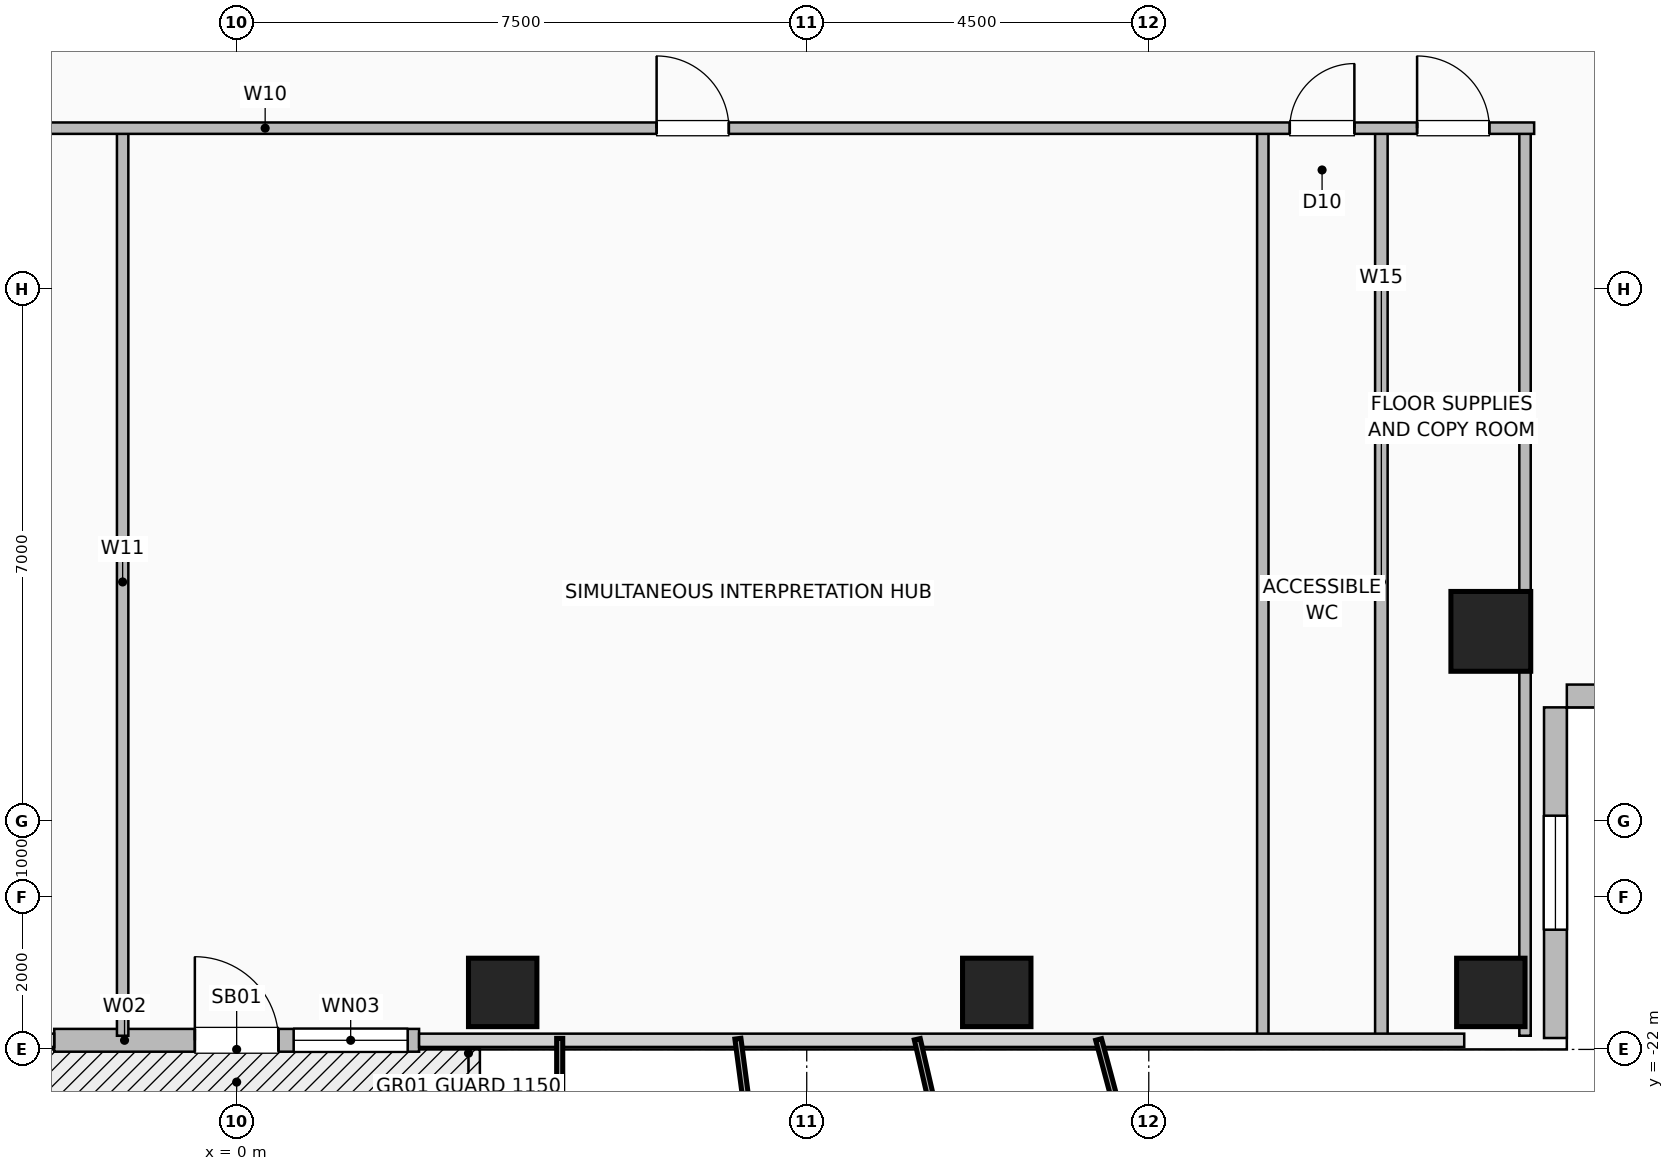
"""IFC4 building model, lengths in metres.
Left out: names, types, materials, properties, quantities, classifications, styles, units other than length and angle.
Written with IfcOpenShell. Run it as: python <this file> out.ifc"""

import sys

from ifc_helpers import new_model, si_unit, direction, frame, frame_2d, origin, origin_2d, place, context, subcontext, project, spatial, rectangle, hollow_rectangle, extrude, element, fill, save


model = new_model("IFC4")
c1 = context("Model", 3, precision=1e-05, world=origin(), true_north=direction((0.0, 1.0)))
c2 = subcontext(c1, "Body", "Model", "MODEL_VIEW")
j1 = project(units=[si_unit("LENGTHUNIT", "METRE"), si_unit("PLANEANGLEUNIT", "RADIAN")], contexts=[c1])
p1 = place(None, origin())
s1 = spatial("IfcSite", under=j1, at=p1, CompositionType="ELEMENT")
p2 = place(p1, origin())
s2 = spatial("IfcBuilding", under=s1, at=p2, CompositionType="ELEMENT")
p3 = place(p2, frame((0.0, 0.0, 104.8)))
s3 = spatial("IfcBuildingStorey", under=s2, at=p3, CompositionType="ELEMENT", Elevation=104.8)
for number, where, z_axis, x_axis in (
    (1, (3.5, -21.25, 0.0), (0.0, 0.0, 1.0), (1.0, 0.0, 0.0)),
    (2, (10.0, -21.25, 0.0), (0.0, 0.0, 1.0), (1.0, 0.0, 0.0)),
    (3, (16.5, -21.25, 0.0), (0.0, 0.0, 1.0), (1.0, 0.0, 0.0)),
):
    element("IfcColumn", number, at=place(p3, frame(where, z_axis=z_axis, x_axis=x_axis)), inside=s3, PredefinedType="COLUMN", context=c2, shape_type="SweptSolid", body=[
        extrude(hollow_rectangle(XDim=0.9, YDim=0.9, WallThickness=0.045, at=origin_2d()), origin(), (0.0, 0.0, 1.0), 3.6),
    ])
p4 = place(p3, frame((16.5, -16.5, 0.0), z_axis=(0.0, 0.0, 1.0), x_axis=(1.0, 0.0, 0.0)))
e4 = element("IfcColumn", 4, at=p4, inside=s3, PredefinedType="COLUMN", context=c2, shape_type="SweptSolid", body=[
    extrude(hollow_rectangle(XDim=1.05, YDim=1.05, WallThickness=0.05, at=origin_2d()), origin(), (0.0, 0.0, 1.0), 3.6),
])
p5 = place(p3, frame((-2.4, -21.88, 0.0), z_axis=(0.0, 0.0, 1.0), x_axis=(1.0, 0.0, 0.0)))
e5 = element("IfcWall", 5, at=p5, inside=s3, PredefinedType="SOLIDWALL", context=c2, shape_type="SweptSolid", body=[
    extrude(rectangle(XDim=4.8, YDim=0.3, at=frame_2d((2.4, 0.0))), origin(), (0.0, 0.0, 1.0), 3.36),
])
p6 = place(p5, frame((1.85, 0.0, 0.0)))
e6 = element("IfcOpeningElement", 6, at=p6, cuts=e5, PredefinedType="OPENING", context=c2, shape_type="SweptSolid", body=[
    extrude(rectangle(XDim=1.1, YDim=2.2, at=frame_2d((0.55, 1.1))), frame((0.0, 0.16, 0.0), z_axis=(0.0, -1.0, 0.0), x_axis=(1.0, 0.0, 0.0)), (0.0, 0.0, 1.0), 0.32),
])
p7 = place(p5, frame((3.15, 0.0, 0.85)))
e7 = element("IfcOpeningElement", 7, at=p7, cuts=e5, PredefinedType="OPENING", context=c2, shape_type="SweptSolid", body=[
    extrude(rectangle(XDim=1.5, YDim=1.8, at=frame_2d((0.75, 0.9))), frame((0.0, 0.16, 0.0), z_axis=(0.0, -1.0, 0.0), x_axis=(1.0, 0.0, 0.0)), (0.0, 0.0, 1.0), 0.32),
])
p8 = place(p3, frame((17.35, -21.85, 0.0), z_axis=(0.0, 0.0, 1.0), x_axis=(0.0, 1.0, 0.0)))
e8 = element("IfcWall", 8, at=p8, inside=s3, PredefinedType="SOLIDWALL", context=c2, shape_type="SweptSolid", body=[
    extrude(rectangle(XDim=4.35, YDim=0.3, at=frame_2d((2.175, 0.0))), origin(), (0.0, 0.0, 1.0), 3.36),
])
p9 = place(p8, frame((1.425, 0.0, 0.9)))
e9 = element("IfcOpeningElement", 9, at=p9, cuts=e8, PredefinedType="OPENING", context=c2, shape_type="SweptSolid", body=[
    extrude(rectangle(XDim=1.5, YDim=1.8, at=frame_2d((0.75, 0.9))), frame((0.0, 0.16, 0.0), z_axis=(0.0, -1.0, 0.0), x_axis=(1.0, 0.0, 0.0)), (0.0, 0.0, 1.0), 0.32),
])
p10 = place(p3, frame((21.85, -17.35, 0.0), z_axis=(0.0, 0.0, 1.0), x_axis=(-1.0, 0.0, 0.0)))
e10 = element("IfcWall", 10, at=p10, inside=s3, PredefinedType="SOLIDWALL", context=c2, shape_type="SweptSolid", body=[
    extrude(rectangle(XDim=4.35, YDim=0.3, at=frame_2d((2.175, 0.0))), origin(), (0.0, 0.0, 1.0), 3.36),
])
p11 = place(p3, frame((15.06, -21.82, 0.0), z_axis=(0.0, 0.0, 1.0), x_axis=(0.0, 1.0, 0.0)))
e11 = element("IfcWall", 11, at=p11, inside=s3, PredefinedType="PLUMBINGWALL", context=c2, shape_type="SweptSolid", body=[
    extrude(rectangle(XDim=11.94, YDim=0.165, at=frame_2d((5.97, 0.0))), origin(), (0.0, 0.0, 1.0), 3.36),
])
for number, where, z_axis, x_axis in (
    (12, (-1.5, -21.82, 0.0), (0.0, 0.0, 1.0), (0.0, 1.0, 0.0)),
    (13, (13.5, -21.82, 0.0), (0.0, 0.0, 1.0), (0.0, 1.0, 0.0)),
    (14, (16.95, -21.82, 0.0), (0.0, 0.0, 1.0), (0.0, 1.0, 0.0)),
):
    element("IfcWall", number, at=place(p3, frame(where, z_axis=z_axis, x_axis=x_axis)), inside=s3, PredefinedType="PARTITIONING", context=c2, shape_type="SweptSolid", body=[
        extrude(rectangle(XDim=11.94, YDim=0.15, at=frame_2d((5.97, 0.0))), origin(), (0.0, 0.0, 1.0), 3.36),
    ])
p12 = place(p3, frame((-17.07, -9.88, 0.0), z_axis=(0.0, 0.0, 1.0), x_axis=(1.0, 0.0, 0.0)))
e15 = element("IfcWall", 15, at=p12, inside=s3, PredefinedType="PARTITIONING", context=c2, shape_type="SweptSolid", body=[
    extrude(rectangle(XDim=34.14, YDim=0.15, at=frame_2d((17.07, 0.0))), origin(), (0.0, 0.0, 1.0), 3.36),
])
p13 = place(p12, frame((3.195, 0.0, 0.0)))
e16 = element("IfcOpeningElement", 16, at=p13, cuts=e15, PredefinedType="OPENING", context=c2, shape_type="SweptSolid", body=[
    extrude(rectangle(XDim=1.8, YDim=2.08, at=frame_2d((0.9, 1.04))), frame((0.0, 0.085, 0.0), z_axis=(0.0, -1.0, 0.0), x_axis=(1.0, 0.0, 0.0)), (0.0, 0.0, 1.0), 0.17),
])
p14 = place(p12, frame((11.345, 0.0, 0.0)))
e17 = element("IfcOpeningElement", 17, at=p14, cuts=e15, PredefinedType="OPENING", context=c2, shape_type="SweptSolid", body=[
    extrude(rectangle(XDim=0.95, YDim=2.06, at=frame_2d((0.475, 1.03))), frame((0.0, 0.085, 0.0), z_axis=(0.0, -1.0, 0.0), x_axis=(1.0, 0.0, 0.0)), (0.0, 0.0, 1.0), 0.17),
])
p15 = place(p12, frame((22.595, 0.0, 0.0)))
e18 = element("IfcOpeningElement", 18, at=p15, cuts=e15, PredefinedType="OPENING", context=c2, shape_type="SweptSolid", body=[
    extrude(rectangle(XDim=0.95, YDim=2.06, at=frame_2d((0.475, 1.03))), frame((0.0, 0.085, 0.0), z_axis=(0.0, -1.0, 0.0), x_axis=(1.0, 0.0, 0.0)), (0.0, 0.0, 1.0), 0.17),
])
p16 = place(p12, frame((30.925, 0.0, 0.0)))
e19 = element("IfcOpeningElement", 19, at=p16, cuts=e15, PredefinedType="OPENING", context=c2, shape_type="SweptSolid", body=[
    extrude(rectangle(XDim=0.85, YDim=2.05, at=frame_2d((0.425, 1.025))), frame((0.0, 0.085, 0.0), z_axis=(0.0, -1.0, 0.0), x_axis=(1.0, 0.0, 0.0)), (0.0, 0.0, 1.0), 0.17),
])
p17 = place(p12, frame((32.6, 0.0, 0.0)))
e20 = element("IfcOpeningElement", 20, at=p17, cuts=e15, PredefinedType="OPENING", context=c2, shape_type="SweptSolid", body=[
    extrude(rectangle(XDim=0.95, YDim=2.06, at=frame_2d((0.475, 1.03))), frame((0.0, 0.085, 0.0), z_axis=(0.0, -1.0, 0.0), x_axis=(1.0, 0.0, 0.0)), (0.0, 0.0, 1.0), 0.17),
])
p18 = place(p6, origin())
e21 = element("IfcDoor", 21, at=p18, inside=s3, OperationType="SINGLE_SWING_LEFT", PredefinedType="DOOR", context=c2, shape_type="SweptSolid", body=[
    extrude(rectangle(XDim=1.1, YDim=2.2, at=frame_2d((0.55, 1.1))), frame((0.0, 0.025, 0.0), z_axis=(0.0, -1.0, 0.0), x_axis=(1.0, 0.0, 0.0)), (0.0, 0.0, 1.0), 0.05),
])
fill(e6, e21)
p19 = place(p7, origin())
e22 = element("IfcWindow", 22, at=p19, inside=s3, PartitioningType="SINGLE_PANEL", PredefinedType="WINDOW", context=c2, shape_type="SweptSolid", body=[
    extrude(rectangle(XDim=1.5, YDim=1.8, at=frame_2d((0.75, 0.9))), frame((0.0, 0.03, 0.0), z_axis=(0.0, -1.0, 0.0), x_axis=(1.0, 0.0, 0.0)), (0.0, 0.0, 1.0), 0.06),
])
fill(e7, e22)
p20 = place(p9, origin())
e23 = element("IfcWindow", 23, at=p20, inside=s3, PartitioningType="SINGLE_PANEL", PredefinedType="WINDOW", context=c2, shape_type="SweptSolid", body=[
    extrude(rectangle(XDim=1.5, YDim=1.8, at=frame_2d((0.75, 0.9))), frame((0.0, 0.03, 0.0), z_axis=(0.0, -1.0, 0.0), x_axis=(1.0, 0.0, 0.0)), (0.0, 0.0, 1.0), 0.06),
])
fill(e9, e23)
p21 = place(p15, origin())
e24 = element("IfcDoor", 24, at=p21, inside=s3, OperationType="SINGLE_SWING_LEFT", PredefinedType="DOOR", context=c2, shape_type="SweptSolid", body=[
    extrude(rectangle(XDim=0.95, YDim=2.06, at=frame_2d((0.475, 1.03))), frame((0.0, 0.025, 0.0), z_axis=(0.0, -1.0, 0.0), x_axis=(1.0, 0.0, 0.0)), (0.0, 0.0, 1.0), 0.05),
])
fill(e18, e24)
p22 = place(p16, origin())
e25 = element("IfcDoor", 25, at=p22, inside=s3, OperationType="SINGLE_SWING_RIGHT", PredefinedType="DOOR", context=c2, shape_type="SweptSolid", body=[
    extrude(rectangle(XDim=0.85, YDim=2.05, at=frame_2d((0.425, 1.025))), frame((0.0, 0.025, 0.0), z_axis=(0.0, -1.0, 0.0), x_axis=(1.0, 0.0, 0.0)), (0.0, 0.0, 1.0), 0.05),
])
fill(e19, e25)
p23 = place(p17, origin())
e26 = element("IfcDoor", 26, at=p23, inside=s3, OperationType="SINGLE_SWING_LEFT", PredefinedType="DOOR", context=c2, shape_type="SweptSolid", body=[
    extrude(rectangle(XDim=0.95, YDim=2.06, at=frame_2d((0.475, 1.03))), frame((0.0, 0.025, 0.0), z_axis=(0.0, -1.0, 0.0), x_axis=(1.0, 0.0, 0.0)), (0.0, 0.0, 1.0), 0.05),
])
fill(e20, e26)
save(model, sys.argv[1])
